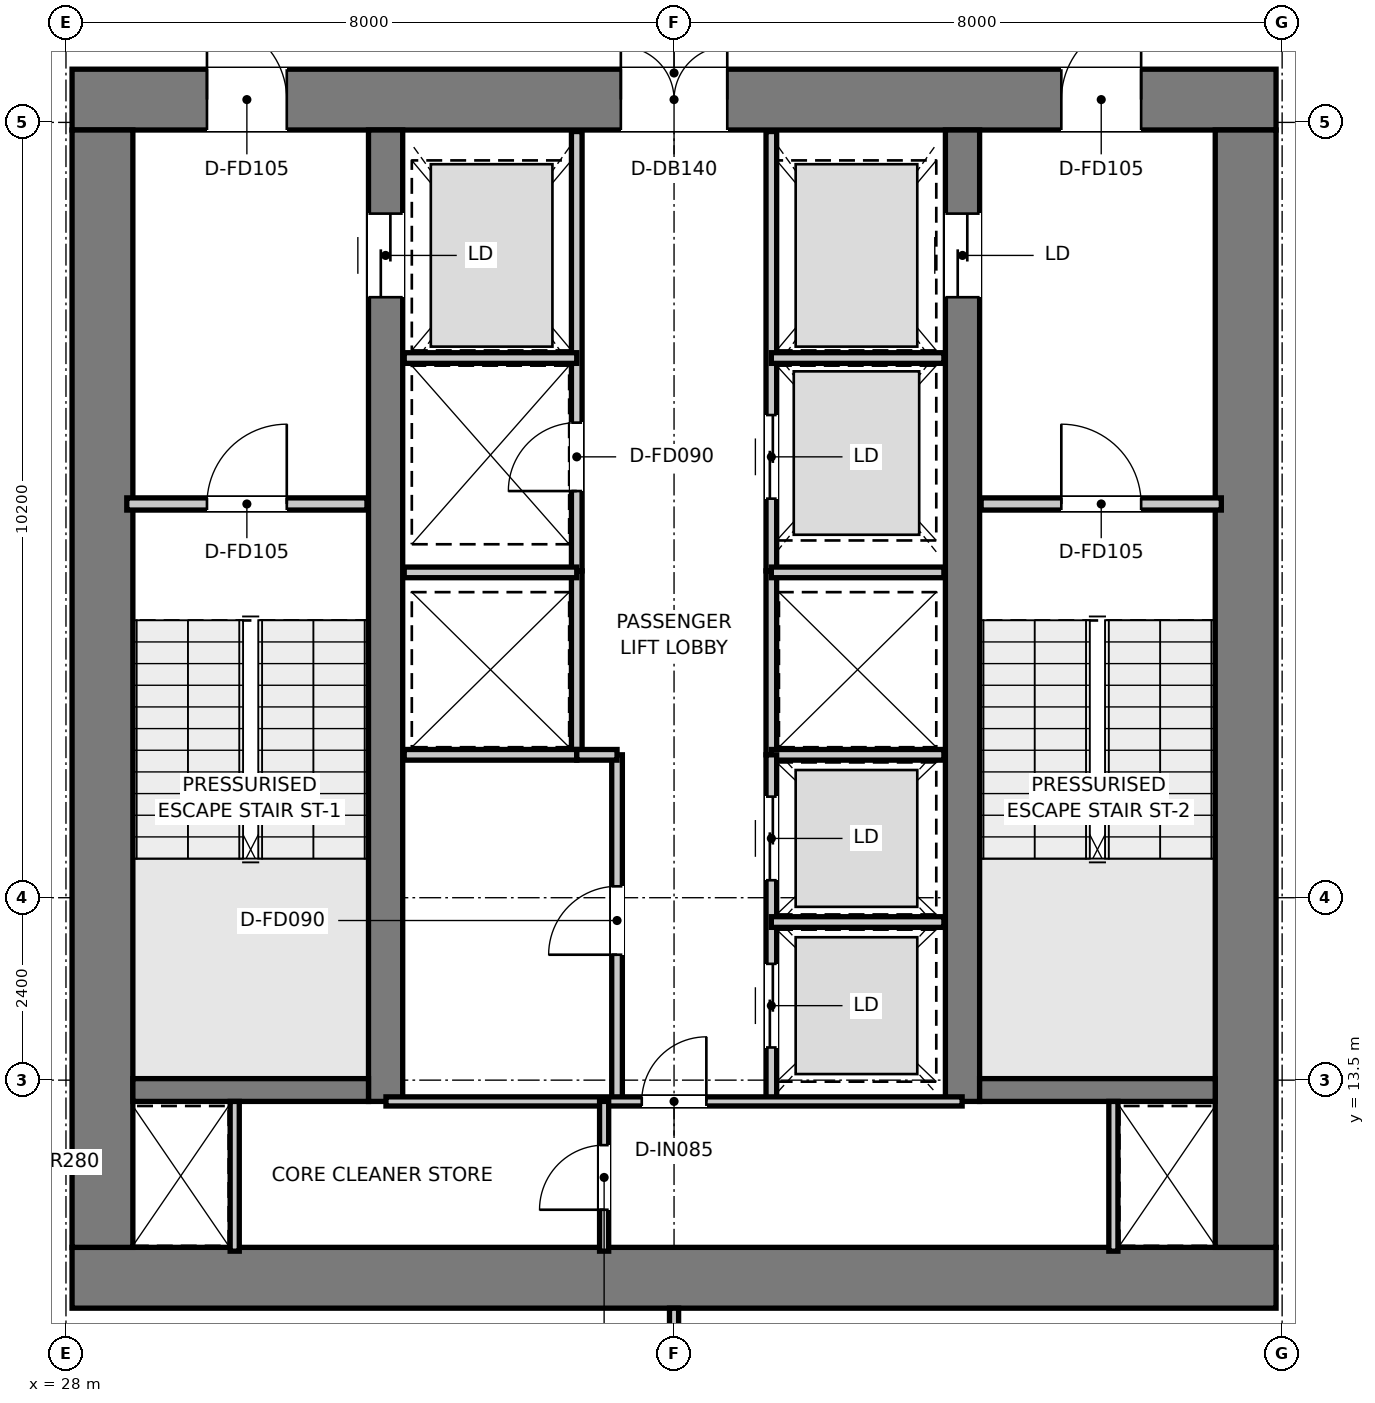
"""IFC4 building model, lengths in metres.
Left out: names, types, materials, properties, quantities, classifications, styles, units other than length and angle.
Written with IfcOpenShell. Run it as: python <this file> out.ifc"""

import sys

from ifc_helpers import new_model, si_unit, direction, frame, frame_2d, origin, place, context, subcontext, project, spatial, rectangle, extrude, element, fill, save


model = new_model("IFC4")
c1 = context("Model", 3, precision=1e-05, world=origin(), true_north=direction((0.0, 1.0)))
c2 = subcontext(c1, "Body", "Model", "MODEL_VIEW")
j1 = project(units=[si_unit("LENGTHUNIT", "METRE"), si_unit("PLANEANGLEUNIT", "RADIAN")], contexts=[c1])
p1 = place(None, origin())
s1 = spatial("IfcSite", under=j1, at=p1, CompositionType="ELEMENT")
p2 = place(p1, origin())
s2 = spatial("IfcBuilding", under=s1, at=p2, CompositionType="ELEMENT")
p3 = place(p2, frame((0.0, 0.0, 197.55)))
s3 = spatial("IfcBuildingStorey", under=s2, at=p3, CompositionType="ELEMENT", Elevation=197.55)
p4 = place(p3, frame((28.08, 10.9, 0.0), z_axis=(0.0, 0.0, 1.0), x_axis=(1.0, 0.0, 0.0)))
e1 = element("IfcWall", 1, at=p4, inside=s3, PredefinedType="SHEAR", context=c2, shape_type="SweptSolid", body=[
    extrude(rectangle(XDim=15.84, YDim=0.8, at=frame_2d((7.92, 0.0))), origin(), (0.0, 0.0, 1.0), 3.95),
])
p5 = place(p3, frame((28.08, 26.4, 0.0), z_axis=(0.0, 0.0, 1.0), x_axis=(1.0, 0.0, 0.0)))
e2 = element("IfcWall", 2, at=p5, inside=s3, PredefinedType="SHEAR", context=c2, shape_type="SweptSolid", body=[
    extrude(rectangle(XDim=15.84, YDim=0.8, at=frame_2d((7.92, 0.0))), origin(), (0.0, 0.0, 1.0), 3.95),
])
p6 = place(p5, frame((7.22, 0.0, 0.0)))
e3 = element("IfcOpeningElement", 3, at=p6, cuts=e2, PredefinedType="OPENING", context=c2, shape_type="SweptSolid", body=[
    extrude(rectangle(XDim=1.4, YDim=2.2, at=frame_2d((0.7, 1.1))), frame((0.0, 0.41, 0.0), z_axis=(0.0, -1.0, 0.0), x_axis=(1.0, 0.0, 0.0)), (0.0, 0.0, 1.0), 0.82),
])
p7 = place(p5, frame((1.775, 0.0, 0.0)))
e4 = element("IfcOpeningElement", 4, at=p7, cuts=e2, PredefinedType="OPENING", context=c2, shape_type="SweptSolid", body=[
    extrude(rectangle(XDim=1.05, YDim=2.1, at=frame_2d((0.525, 1.05))), frame((0.0, 0.41, 0.0), z_axis=(0.0, -1.0, 0.0), x_axis=(1.0, 0.0, 0.0)), (0.0, 0.0, 1.0), 0.82),
])
p8 = place(p5, frame((13.015, 0.0, 0.0)))
e5 = element("IfcOpeningElement", 5, at=p8, cuts=e2, PredefinedType="OPENING", context=c2, shape_type="SweptSolid", body=[
    extrude(rectangle(XDim=1.05, YDim=2.1, at=frame_2d((0.525, 1.05))), frame((0.0, 0.41, 0.0), z_axis=(0.0, -1.0, 0.0), x_axis=(1.0, 0.0, 0.0)), (0.0, 0.0, 1.0), 0.82),
])
for number, where, z_axis, x_axis in (
    (6, (28.48, 11.3, 0.0), (0.0, 0.0, 1.0), (0.0, 1.0, 0.0)),
    (7, (43.52, 11.3, 0.0), (0.0, 0.0, 1.0), (0.0, 1.0, 0.0)),
):
    element("IfcWall", number, at=place(p3, frame(where, z_axis=z_axis, x_axis=x_axis)), inside=s3, PredefinedType="SHEAR", context=c2, shape_type="SweptSolid", body=[
        extrude(rectangle(XDim=14.7, YDim=0.8, at=frame_2d((7.35, 0.0))), origin(), (0.0, 0.0, 1.0), 3.95),
    ])
p9 = place(p3, frame((32.205, 13.22, 0.0), z_axis=(0.0, 0.0, 1.0), x_axis=(0.0, 1.0, 0.0)))
e8 = element("IfcWall", 8, at=p9, inside=s3, PredefinedType="SHEAR", context=c2, shape_type="SweptSolid", body=[
    extrude(rectangle(XDim=12.78, YDim=0.45, at=frame_2d((6.39, 0.0))), origin(), (0.0, 0.0, 1.0), 3.95),
])
p10 = place(p9, frame((10.58, 0.0, 0.0)))
e9 = element("IfcOpeningElement", 9, at=p10, cuts=e8, PredefinedType="OPENING", context=c2, shape_type="SweptSolid", body=[
    extrude(rectangle(XDim=1.1, YDim=2.15, at=frame_2d((0.55, 1.075))), frame((0.0, 0.235, 0.0), z_axis=(0.0, -1.0, 0.0), x_axis=(1.0, 0.0, 0.0)), (0.0, 0.0, 1.0), 0.47),
])
p11 = place(p3, frame((39.795, 13.22, 0.0), z_axis=(0.0, 0.0, 1.0), x_axis=(0.0, 1.0, 0.0)))
e10 = element("IfcWall", 10, at=p11, inside=s3, PredefinedType="SHEAR", context=c2, shape_type="SweptSolid", body=[
    extrude(rectangle(XDim=12.78, YDim=0.45, at=frame_2d((6.39, 0.0))), origin(), (0.0, 0.0, 1.0), 3.95),
])
p12 = place(p11, frame((10.58, 0.0, 0.0)))
e11 = element("IfcOpeningElement", 11, at=p12, cuts=e10, PredefinedType="OPENING", context=c2, shape_type="SweptSolid", body=[
    extrude(rectangle(XDim=1.1, YDim=2.15, at=frame_2d((0.55, 1.075))), frame((0.0, 0.235, 0.0), z_axis=(0.0, -1.0, 0.0), x_axis=(1.0, 0.0, 0.0)), (0.0, 0.0, 1.0), 0.47),
])
for number, where, z_axis, x_axis in (
    (12, (28.88, 13.37, 0.0), (0.0, 0.0, 1.0), (1.0, 0.0, 0.0)),
    (13, (40.02, 13.37, 0.0), (0.0, 0.0, 1.0), (1.0, 0.0, 0.0)),
):
    element("IfcWall", number, at=place(p3, frame(where, z_axis=z_axis, x_axis=x_axis)), inside=s3, PredefinedType="SHEAR", context=c2, shape_type="SweptSolid", body=[
        extrude(rectangle(XDim=3.1, YDim=0.3, at=frame_2d((1.55, 0.0))), origin(), (0.0, 0.0, 1.0), 3.95),
    ])
p13 = place(p3, frame((28.8, 21.08, 0.0), z_axis=(0.0, 0.0, 1.0), x_axis=(1.0, 0.0, 0.0)))
e14 = element("IfcWall", 14, at=p13, inside=s3, PredefinedType="PARTITIONING", context=c2, shape_type="SweptSolid", body=[
    extrude(rectangle(XDim=3.16, YDim=0.16, at=frame_2d((1.58, 0.0))), origin(), (0.0, 0.0, 1.0), 3.59),
])
p14 = place(p13, frame((1.055, 0.0, 0.0)))
e15 = element("IfcOpeningElement", 15, at=p14, cuts=e14, PredefinedType="OPENING", context=c2, shape_type="SweptSolid", body=[
    extrude(rectangle(XDim=1.05, YDim=2.1, at=frame_2d((0.525, 1.05))), frame((0.0, 0.09, 0.0), z_axis=(0.0, -1.0, 0.0), x_axis=(1.0, 0.0, 0.0)), (0.0, 0.0, 1.0), 0.18),
])
p15 = place(p3, frame((40.04, 21.08, 0.0), z_axis=(0.0, 0.0, 1.0), x_axis=(1.0, 0.0, 0.0)))
e16 = element("IfcWall", 16, at=p15, inside=s3, PredefinedType="PARTITIONING", context=c2, shape_type="SweptSolid", body=[
    extrude(rectangle(XDim=3.16, YDim=0.16, at=frame_2d((1.58, 0.0))), origin(), (0.0, 0.0, 1.0), 3.59),
])
p16 = place(p15, frame((1.055, 0.0, 0.0)))
e17 = element("IfcOpeningElement", 17, at=p16, cuts=e16, PredefinedType="OPENING", context=c2, shape_type="SweptSolid", body=[
    extrude(rectangle(XDim=1.05, YDim=2.1, at=frame_2d((0.525, 1.05))), frame((0.0, 0.09, 0.0), z_axis=(0.0, -1.0, 0.0), x_axis=(1.0, 0.0, 0.0)), (0.0, 0.0, 1.0), 0.18),
])
p17 = place(p3, frame((34.72, 20.2, 0.0), z_axis=(0.0, 0.0, 1.0), x_axis=(0.0, 1.0, 0.0)))
e18 = element("IfcWall", 18, at=p17, inside=s3, PredefinedType="PARTITIONING", context=c2, shape_type="SweptSolid", body=[
    extrude(rectangle(XDim=5.78, YDim=0.14, at=frame_2d((2.89, 0.0))), origin(), (0.0, 0.0, 1.0), 2.59),
])
p18 = place(p17, frame((1.05, 0.0, 0.0)))
e19 = element("IfcOpeningElement", 19, at=p18, cuts=e18, PredefinedType="OPENING", context=c2, shape_type="SweptSolid", body=[
    extrude(rectangle(XDim=0.9, YDim=2.1, at=frame_2d((0.45, 1.05))), frame((0.0, 0.08, 0.0), z_axis=(0.0, -1.0, 0.0), x_axis=(1.0, 0.0, 0.0)), (0.0, 0.0, 1.0), 0.16),
])
p19 = place(p3, frame((37.28, 20.2, 0.0), z_axis=(0.0, 0.0, 1.0), x_axis=(0.0, 1.0, 0.0)))
e20 = element("IfcWall", 20, at=p19, inside=s3, PredefinedType="PARTITIONING", context=c2, shape_type="SweptSolid", body=[
    extrude(rectangle(XDim=5.78, YDim=0.14, at=frame_2d((2.89, 0.0))), origin(), (0.0, 0.0, 1.0), 2.59),
])
p20 = place(p19, frame((0.95, 0.0, 0.0)))
e21 = element("IfcOpeningElement", 21, at=p20, cuts=e20, PredefinedType="OPENING", context=c2, shape_type="SweptSolid", body=[
    extrude(rectangle(XDim=1.1, YDim=2.15, at=frame_2d((0.55, 1.075))), frame((0.0, 0.08, 0.0), z_axis=(0.0, -1.0, 0.0), x_axis=(1.0, 0.0, 0.0)), (0.0, 0.0, 1.0), 0.16),
])
for number, where, z_axis, x_axis in (
    (22, (32.45, 23.0, 0.0), (0.0, 0.0, 1.0), (1.0, 0.0, 0.0)),
    (23, (37.28, 23.0, 0.0), (0.0, 0.0, 1.0), (1.0, 0.0, 0.0)),
):
    element("IfcWall", number, at=place(p3, frame(where, z_axis=z_axis, x_axis=x_axis)), inside=s3, PredefinedType="PARTITIONING", context=c2, shape_type="SweptSolid", body=[
        extrude(rectangle(XDim=2.27, YDim=0.14, at=frame_2d((1.135, 0.0))), origin(), (0.0, 0.0, 1.0), 2.59),
    ])
for number, where, z_axis, x_axis in (
    (24, (34.72, 17.78, 0.0), (0.0, 0.0, 1.0), (0.0, 1.0, 0.0)),
    (25, (37.28, 17.78, 0.0), (0.0, 0.0, 1.0), (0.0, 1.0, 0.0)),
):
    element("IfcWall", number, at=place(p3, frame(where, z_axis=z_axis, x_axis=x_axis)), inside=s3, PredefinedType="PARTITIONING", context=c2, shape_type="SweptSolid", body=[
        extrude(rectangle(XDim=2.42, YDim=0.14, at=frame_2d((1.21, 0.0))), origin(), (0.0, 0.0, 1.0), 3.59),
    ])
for number, where, z_axis, x_axis in (
    (26, (32.45, 17.78, 0.0), (0.0, 0.0, 1.0), (1.0, 0.0, 0.0)),
    (27, (32.45, 20.18, 0.0), (0.0, 0.0, 1.0), (1.0, 0.0, 0.0)),
    (28, (37.28, 17.78, 0.0), (0.0, 0.0, 1.0), (1.0, 0.0, 0.0)),
    (29, (37.28, 20.18, 0.0), (0.0, 0.0, 1.0), (1.0, 0.0, 0.0)),
):
    element("IfcWall", number, at=place(p3, frame(where, z_axis=z_axis, x_axis=x_axis)), inside=s3, PredefinedType="PARTITIONING", context=c2, shape_type="SweptSolid", body=[
        extrude(rectangle(XDim=2.27, YDim=0.14, at=frame_2d((1.135, 0.0))), origin(), (0.0, 0.0, 1.0), 3.59),
    ])
p21 = place(p3, frame((35.25, 13.22, 0.0), z_axis=(0.0, 0.0, 1.0), x_axis=(0.0, 1.0, 0.0)))
e30 = element("IfcWall", 30, at=p21, inside=s3, PredefinedType="PARTITIONING", context=c2, shape_type="SweptSolid", body=[
    extrude(rectangle(XDim=4.56, YDim=0.14, at=frame_2d((2.28, 0.0))), origin(), (0.0, 0.0, 1.0), 3.59),
])
p22 = place(p21, frame((1.93, 0.0, 0.0)))
e31 = element("IfcOpeningElement", 31, at=p22, cuts=e30, PredefinedType="OPENING", context=c2, shape_type="SweptSolid", body=[
    extrude(rectangle(XDim=0.9, YDim=2.1, at=frame_2d((0.45, 1.05))), frame((0.0, 0.08, 0.0), z_axis=(0.0, -1.0, 0.0), x_axis=(1.0, 0.0, 0.0)), (0.0, 0.0, 1.0), 0.16),
])
p23 = place(p3, frame((34.72, 17.78, 0.0), z_axis=(0.0, 0.0, 1.0), x_axis=(1.0, 0.0, 0.0)))
e32 = element("IfcWall", 32, at=p23, inside=s3, PredefinedType="PARTITIONING", context=c2, shape_type="SweptSolid", body=[
    extrude(rectangle(XDim=0.53, YDim=0.14, at=frame_2d((0.265, 0.0))), origin(), (0.0, 0.0, 1.0), 3.59),
])
p24 = place(p3, frame((37.28, 13.22, 0.0), z_axis=(0.0, 0.0, 1.0), x_axis=(0.0, 1.0, 0.0)))
e33 = element("IfcWall", 33, at=p24, inside=s3, PredefinedType="PARTITIONING", context=c2, shape_type="SweptSolid", body=[
    extrude(rectangle(XDim=4.56, YDim=0.14, at=frame_2d((2.28, 0.0))), origin(), (0.0, 0.0, 1.0), 3.59),
])
p25 = place(p24, frame((0.71, 0.0, 0.0)))
e34 = element("IfcOpeningElement", 34, at=p25, cuts=e33, PredefinedType="OPENING", context=c2, shape_type="SweptSolid", body=[
    extrude(rectangle(XDim=1.1, YDim=2.15, at=frame_2d((0.55, 1.075))), frame((0.0, 0.08, 0.0), z_axis=(0.0, -1.0, 0.0), x_axis=(1.0, 0.0, 0.0)), (0.0, 0.0, 1.0), 0.16),
])
p26 = place(p24, frame((2.91, 0.0, 0.0)))
e35 = element("IfcOpeningElement", 35, at=p26, cuts=e33, PredefinedType="OPENING", context=c2, shape_type="SweptSolid", body=[
    extrude(rectangle(XDim=1.1, YDim=2.15, at=frame_2d((0.55, 1.075))), frame((0.0, 0.08, 0.0), z_axis=(0.0, -1.0, 0.0), x_axis=(1.0, 0.0, 0.0)), (0.0, 0.0, 1.0), 0.16),
])
p27 = place(p3, frame((37.28, 15.58, 0.0), z_axis=(0.0, 0.0, 1.0), x_axis=(1.0, 0.0, 0.0)))
e36 = element("IfcWall", 36, at=p27, inside=s3, PredefinedType="PARTITIONING", context=c2, shape_type="SweptSolid", body=[
    extrude(rectangle(XDim=2.27, YDim=0.14, at=frame_2d((1.135, 0.0))), origin(), (0.0, 0.0, 1.0), 3.59),
])
for number, where, z_axis, x_axis in (
    (37, (30.22, 11.25, 0.0), (0.0, 0.0, 1.0), (0.0, 1.0, 0.0)),
    (38, (41.78, 11.25, 0.0), (0.0, 0.0, 1.0), (0.0, 1.0, 0.0)),
):
    element("IfcWall", number, at=place(p3, frame(where, z_axis=z_axis, x_axis=x_axis)), inside=s3, PredefinedType="PARTITIONING", context=c2, shape_type="SweptSolid", body=[
        extrude(rectangle(XDim=1.97, YDim=0.12, at=frame_2d((0.985, 0.0))), origin(), (0.0, 0.0, 1.0), 3.59),
    ])
p28 = place(p3, frame((32.21, 13.22, 0.0), z_axis=(0.0, 0.0, 1.0), x_axis=(1.0, 0.0, 0.0)))
e39 = element("IfcWall", 39, at=p28, inside=s3, PredefinedType="PARTITIONING", context=c2, shape_type="SweptSolid", body=[
    extrude(rectangle(XDim=7.58, YDim=0.12, at=frame_2d((3.79, 0.0))), origin(), (0.0, 0.0, 1.0), 3.59),
])
p29 = place(p28, frame((3.365, 0.0, 0.0)))
e40 = element("IfcOpeningElement", 40, at=p29, cuts=e39, PredefinedType="OPENING", context=c2, shape_type="SweptSolid", body=[
    extrude(rectangle(XDim=0.85, YDim=2.1, at=frame_2d((0.425, 1.05))), frame((0.0, 0.07, 0.0), z_axis=(0.0, -1.0, 0.0), x_axis=(1.0, 0.0, 0.0)), (0.0, 0.0, 1.0), 0.14),
])
p30 = place(p3, frame((35.08, 11.25, 0.0), z_axis=(0.0, 0.0, 1.0), x_axis=(0.0, 1.0, 0.0)))
e41 = element("IfcWall", 41, at=p30, inside=s3, PredefinedType="PARTITIONING", context=c2, shape_type="SweptSolid", body=[
    extrude(rectangle(XDim=1.97, YDim=0.12, at=frame_2d((0.985, 0.0))), origin(), (0.0, 0.0, 1.0), 3.59),
])
p31 = place(p30, frame((0.545, 0.0, 0.0)))
e42 = element("IfcOpeningElement", 42, at=p31, cuts=e41, PredefinedType="OPENING", context=c2, shape_type="SweptSolid", body=[
    extrude(rectangle(XDim=0.85, YDim=2.1, at=frame_2d((0.425, 1.05))), frame((0.0, 0.07, 0.0), z_axis=(0.0, -1.0, 0.0), x_axis=(1.0, 0.0, 0.0)), (0.0, 0.0, 1.0), 0.14),
])
p32 = place(p3, frame((36.0, -0.302, 0.0), z_axis=(0.0, 0.0, 1.0), x_axis=(0.0, 1.0, 0.0)))
e43 = element("IfcWall", 43, at=p32, inside=s3, PredefinedType="PARTITIONING", context=c2, shape_type="SweptSolid", body=[
    extrude(rectangle(XDim=10.802, YDim=0.12, at=frame_2d((5.401, 0.0))), origin(), (0.0, 0.0, 1.0), 3.59),
])
p33 = place(p14, origin())
e44 = element("IfcDoor", 44, at=p33, inside=s3, OperationType="SINGLE_SWING_RIGHT", PredefinedType="DOOR", context=c2, shape_type="SweptSolid", body=[
    extrude(rectangle(XDim=1.05, YDim=2.1, at=frame_2d((0.525, 1.05))), frame((0.0, 0.025, 0.0), z_axis=(0.0, -1.0, 0.0), x_axis=(1.0, 0.0, 0.0)), (0.0, 0.0, 1.0), 0.05),
])
fill(e15, e44)
p34 = place(p16, origin())
e45 = element("IfcDoor", 45, at=p34, inside=s3, OperationType="SINGLE_SWING_LEFT", PredefinedType="DOOR", context=c2, shape_type="SweptSolid", body=[
    extrude(rectangle(XDim=1.05, YDim=2.1, at=frame_2d((0.525, 1.05))), frame((0.0, 0.025, 0.0), z_axis=(0.0, -1.0, 0.0), x_axis=(1.0, 0.0, 0.0)), (0.0, 0.0, 1.0), 0.05),
])
fill(e17, e45)
p35 = place(p6, origin())
e46 = element("IfcDoor", 46, at=p35, inside=s3, OperationType="DOUBLE_DOOR_SINGLE_SWING", PredefinedType="DOOR", context=c2, shape_type="SweptSolid", body=[
    extrude(rectangle(XDim=1.4, YDim=2.2, at=frame_2d((0.7, 1.1))), frame((0.0, 0.025, 0.0), z_axis=(0.0, -1.0, 0.0), x_axis=(1.0, 0.0, 0.0)), (0.0, 0.0, 1.0), 0.05),
])
fill(e3, e46)
p36 = place(p7, origin())
e47 = element("IfcDoor", 47, at=p36, inside=s3, OperationType="SINGLE_SWING_LEFT", PredefinedType="DOOR", context=c2, shape_type="SweptSolid", body=[
    extrude(rectangle(XDim=1.05, YDim=2.1, at=frame_2d((0.525, 1.05))), frame((0.0, 0.025, 0.0), z_axis=(0.0, -1.0, 0.0), x_axis=(1.0, 0.0, 0.0)), (0.0, 0.0, 1.0), 0.05),
])
fill(e4, e47)
p37 = place(p8, origin())
e48 = element("IfcDoor", 48, at=p37, inside=s3, OperationType="SINGLE_SWING_RIGHT", PredefinedType="DOOR", context=c2, shape_type="SweptSolid", body=[
    extrude(rectangle(XDim=1.05, YDim=2.1, at=frame_2d((0.525, 1.05))), frame((0.0, 0.025, 0.0), z_axis=(0.0, -1.0, 0.0), x_axis=(1.0, 0.0, 0.0)), (0.0, 0.0, 1.0), 0.05),
])
fill(e5, e48)
p38 = place(p10, origin())
e49 = element("IfcDoor", 49, at=p38, inside=s3, OperationType="DOUBLE_DOOR_SLIDING", PredefinedType="DOOR", context=c2, shape_type="SweptSolid", body=[
    extrude(rectangle(XDim=1.1, YDim=2.15, at=frame_2d((0.55, 1.075))), frame((0.0, 0.025, 0.0), z_axis=(0.0, -1.0, 0.0), x_axis=(1.0, 0.0, 0.0)), (0.0, 0.0, 1.0), 0.05),
])
fill(e9, e49)
p39 = place(p12, origin())
e50 = element("IfcDoor", 50, at=p39, inside=s3, OperationType="DOUBLE_DOOR_SLIDING", PredefinedType="DOOR", context=c2, shape_type="SweptSolid", body=[
    extrude(rectangle(XDim=1.1, YDim=2.15, at=frame_2d((0.55, 1.075))), frame((0.0, 0.025, 0.0), z_axis=(0.0, -1.0, 0.0), x_axis=(1.0, 0.0, 0.0)), (0.0, 0.0, 1.0), 0.05),
])
fill(e11, e50)
p40 = place(p18, origin())
e51 = element("IfcDoor", 51, at=p40, inside=s3, OperationType="SINGLE_SWING_LEFT", PredefinedType="DOOR", context=c2, shape_type="SweptSolid", body=[
    extrude(rectangle(XDim=0.9, YDim=2.1, at=frame_2d((0.45, 1.05))), frame((0.0, 0.025, 0.0), z_axis=(0.0, -1.0, 0.0), x_axis=(1.0, 0.0, 0.0)), (0.0, 0.0, 1.0), 0.05),
])
fill(e19, e51)
p41 = place(p20, origin())
e52 = element("IfcDoor", 52, at=p41, inside=s3, OperationType="DOUBLE_DOOR_SLIDING", PredefinedType="DOOR", context=c2, shape_type="SweptSolid", body=[
    extrude(rectangle(XDim=1.1, YDim=2.15, at=frame_2d((0.55, 1.075))), frame((0.0, 0.025, 0.0), z_axis=(0.0, -1.0, 0.0), x_axis=(1.0, 0.0, 0.0)), (0.0, 0.0, 1.0), 0.05),
])
fill(e21, e52)
p42 = place(p22, origin())
e53 = element("IfcDoor", 53, at=p42, inside=s3, OperationType="SINGLE_SWING_LEFT", PredefinedType="DOOR", context=c2, shape_type="SweptSolid", body=[
    extrude(rectangle(XDim=0.9, YDim=2.1, at=frame_2d((0.45, 1.05))), frame((0.0, 0.025, 0.0), z_axis=(0.0, -1.0, 0.0), x_axis=(1.0, 0.0, 0.0)), (0.0, 0.0, 1.0), 0.05),
])
fill(e31, e53)
p43 = place(p25, origin())
e54 = element("IfcDoor", 54, at=p43, inside=s3, OperationType="DOUBLE_DOOR_SLIDING", PredefinedType="DOOR", context=c2, shape_type="SweptSolid", body=[
    extrude(rectangle(XDim=1.1, YDim=2.15, at=frame_2d((0.55, 1.075))), frame((0.0, 0.025, 0.0), z_axis=(0.0, -1.0, 0.0), x_axis=(1.0, 0.0, 0.0)), (0.0, 0.0, 1.0), 0.05),
])
fill(e34, e54)
p44 = place(p26, origin())
e55 = element("IfcDoor", 55, at=p44, inside=s3, OperationType="DOUBLE_DOOR_SLIDING", PredefinedType="DOOR", context=c2, shape_type="SweptSolid", body=[
    extrude(rectangle(XDim=1.1, YDim=2.15, at=frame_2d((0.55, 1.075))), frame((0.0, 0.025, 0.0), z_axis=(0.0, -1.0, 0.0), x_axis=(1.0, 0.0, 0.0)), (0.0, 0.0, 1.0), 0.05),
])
fill(e35, e55)
p45 = place(p29, origin())
e56 = element("IfcDoor", 56, at=p45, inside=s3, OperationType="SINGLE_SWING_RIGHT", PredefinedType="DOOR", context=c2, shape_type="SweptSolid", body=[
    extrude(rectangle(XDim=0.85, YDim=2.1, at=frame_2d((0.425, 1.05))), frame((0.0, 0.025, 0.0), z_axis=(0.0, -1.0, 0.0), x_axis=(1.0, 0.0, 0.0)), (0.0, 0.0, 1.0), 0.05),
])
fill(e40, e56)
p46 = place(p31, origin())
e57 = element("IfcDoor", 57, at=p46, inside=s3, OperationType="SINGLE_SWING_LEFT", PredefinedType="DOOR", context=c2, shape_type="SweptSolid", body=[
    extrude(rectangle(XDim=0.85, YDim=2.1, at=frame_2d((0.425, 1.05))), frame((0.0, 0.025, 0.0), z_axis=(0.0, -1.0, 0.0), x_axis=(1.0, 0.0, 0.0)), (0.0, 0.0, 1.0), 0.05),
])
fill(e42, e57)
save(model, sys.argv[1])
